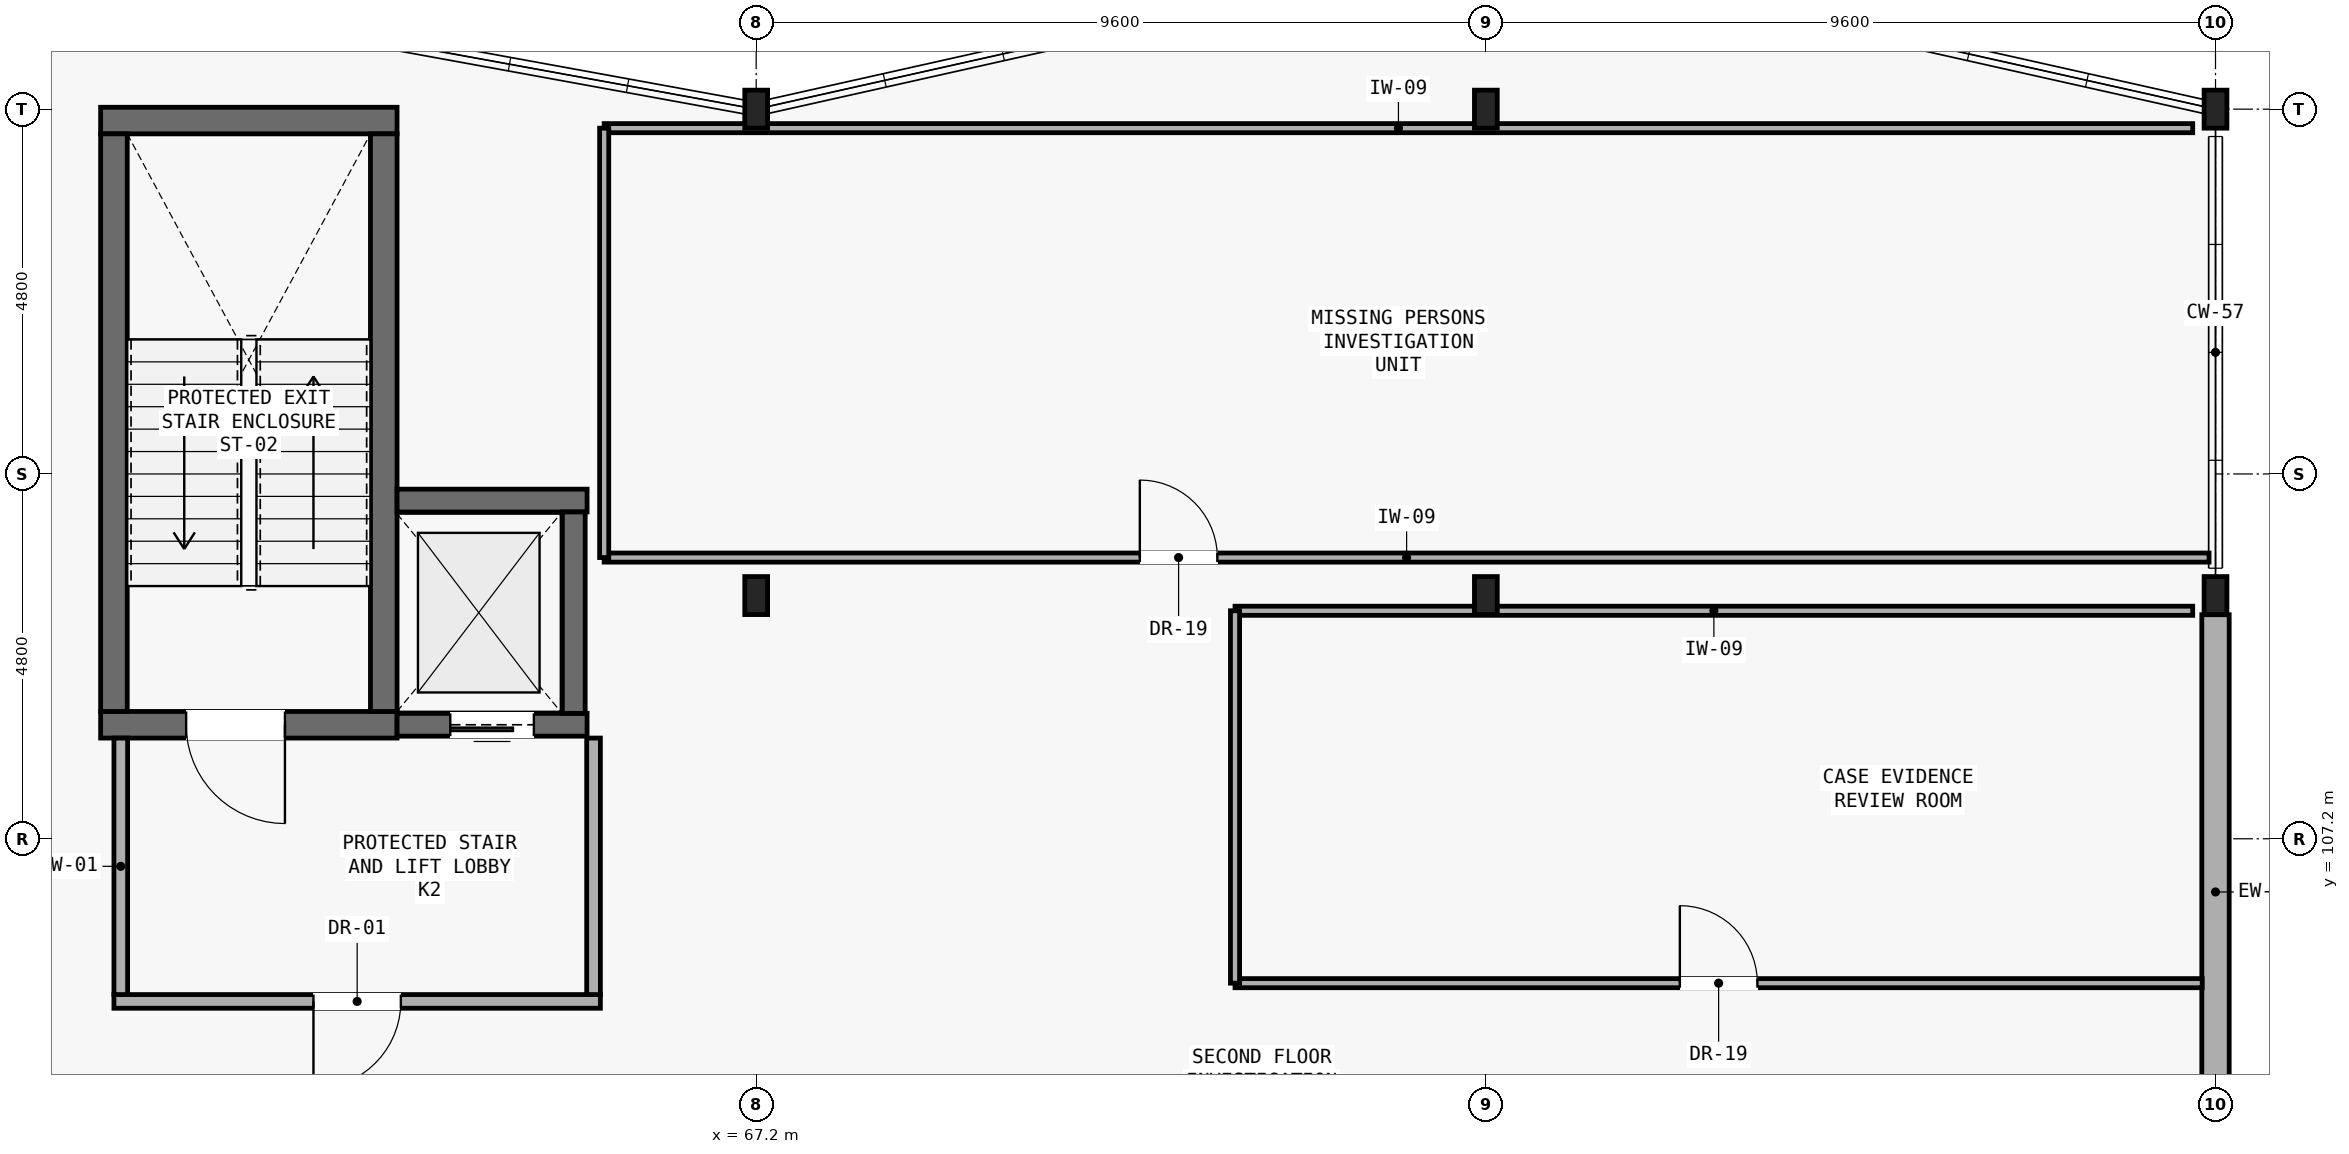
"""IFC4 building model, lengths in metres.
Left out: names, types, materials, properties, quantities, classifications, styles, units other than length and angle.
Written with IfcOpenShell. Run it as: python <this file> out.ifc"""

import sys

from ifc_helpers import new_model, si_unit, direction, frame, frame_2d, origin, origin_2d, place, context, subcontext, project, spatial, rectangle, i_section, extrude, element, fill, save


model = new_model("IFC4")
c1 = context("Model", 3, precision=1e-05, world=origin(), true_north=direction((0.0, 1.0)))
c2 = subcontext(c1, "Body", "Model", "MODEL_VIEW")
j1 = project(units=[si_unit("LENGTHUNIT", "METRE"), si_unit("PLANEANGLEUNIT", "RADIAN")], contexts=[c1])
p1 = place(None, origin())
s1 = spatial("IfcSite", under=j1, at=p1, CompositionType="ELEMENT")
p2 = place(p1, origin())
s2 = spatial("IfcBuilding", under=s1, at=p2, CompositionType="ELEMENT")
p3 = place(p2, frame((0.0, 0.0, 9.45)))
s3 = spatial("IfcBuildingStorey", under=s2, at=p3, CompositionType="ELEMENT", Elevation=9.45)
for number, where, z_axis, x_axis in (
    (1, (67.2, 110.4, 0.0), (0.0, 0.0, 1.0), (1.0, 0.0, 0.0)),
    (2, (67.2, 116.8, 0.0), (0.0, 0.0, 1.0), (1.0, 0.0, 0.0)),
    (3, (76.8, 110.4, 0.0), (0.0, 0.0, 1.0), (1.0, 0.0, 0.0)),
    (4, (76.8, 116.8, 0.0), (0.0, 0.0, 1.0), (1.0, 0.0, 0.0)),
    (5, (86.4, 110.4, 0.0), (0.0, 0.0, 1.0), (1.0, 0.0, 0.0)),
    (6, (86.4, 116.8, 0.0), (0.0, 0.0, 1.0), (1.0, 0.0, 0.0)),
):
    element("IfcColumn", number, at=place(p3, frame(where, z_axis=z_axis, x_axis=x_axis)), inside=s3, PredefinedType="COLUMN", context=c2, shape_type="SweptSolid", body=[
        extrude(i_section(OverallWidth=0.3, OverallDepth=0.5, WebThickness=0.014, FlangeThickness=0.028, FilletRadius=0.027, at=origin_2d()), origin(), (0.0, 0.0, 1.0), 4.2),
    ])
p4 = place(p3, frame((86.4, 102.852, 0.0), z_axis=(0.0, 0.0, 1.0), x_axis=(0.0, 1.0, 0.0)))
e7 = element("IfcWall", 7, at=p4, inside=s3, PredefinedType="SOLIDWALL", context=c2, shape_type="SweptSolid", body=[
    extrude(rectangle(XDim=7.296, YDim=0.36, at=frame_2d((3.648, 0.0))), origin(), (0.0, 0.0, 1.0), 3.51),
])
p5 = place(p3, frame((58.575, 108.7, 0.0), z_axis=(0.0, 0.0, 1.0), x_axis=(1.0, 0.0, 0.0)))
e8 = element("IfcWall", 8, at=p5, inside=s3, PredefinedType="SHEAR", context=c2, shape_type="SweptSolid", body=[
    extrude(rectangle(XDim=3.9, YDim=0.35, at=frame_2d((1.95, 0.0))), origin(), (0.0, 0.0, 1.0), 3.97),
])
p6 = place(p5, frame((1.125, 0.0, 0.0)))
e9 = element("IfcOpeningElement", 9, at=p6, cuts=e8, PredefinedType="OPENING", context=c2, shape_type="SweptSolid", body=[
    extrude(rectangle(XDim=1.3, YDim=2.15, at=frame_2d((0.65, 1.075))), frame((0.0, 0.185, 0.0), z_axis=(0.0, -1.0, 0.0), x_axis=(1.0, 0.0, 0.0)), (0.0, 0.0, 1.0), 0.37),
])
p7 = place(p3, frame((58.575, 116.65, 0.0), z_axis=(0.0, 0.0, 1.0), x_axis=(1.0, 0.0, 0.0)))
e10 = element("IfcWall", 10, at=p7, inside=s3, PredefinedType="SHEAR", context=c2, shape_type="SweptSolid", body=[
    extrude(rectangle(XDim=3.9, YDim=0.35, at=frame_2d((1.95, 0.0))), origin(), (0.0, 0.0, 1.0), 3.97),
])
for number, where, z_axis, x_axis in (
    (11, (58.75, 108.875, 0.0), (0.0, 0.0, 1.0), (0.0, 1.0, 0.0)),
    (12, (62.3, 108.875, 0.0), (0.0, 0.0, 1.0), (0.0, 1.0, 0.0)),
):
    element("IfcWall", number, at=place(p3, frame(where, z_axis=z_axis, x_axis=x_axis)), inside=s3, PredefinedType="SHEAR", context=c2, shape_type="SweptSolid", body=[
        extrude(rectangle(XDim=7.6, YDim=0.35, at=frame_2d((3.8, 0.0))), origin(), (0.0, 0.0, 1.0), 3.97),
    ])
p8 = place(p3, frame((62.475, 108.7, 0.0), z_axis=(0.0, 0.0, 1.0), x_axis=(1.0, 0.0, 0.0)))
e13 = element("IfcWall", 13, at=p8, inside=s3, PredefinedType="SHEAR", context=c2, shape_type="SweptSolid", body=[
    extrude(rectangle(XDim=2.5, YDim=0.3, at=frame_2d((1.25, 0.0))), origin(), (0.0, 0.0, 1.0), 3.97),
])
p9 = place(p8, frame((0.7, 0.0, 0.0)))
e14 = element("IfcOpeningElement", 14, at=p9, cuts=e13, PredefinedType="OPENING", context=c2, shape_type="SweptSolid", body=[
    extrude(rectangle(XDim=1.1, YDim=2.1, at=frame_2d((0.55, 1.05))), frame((0.0, 0.16, 0.0), z_axis=(0.0, -1.0, 0.0), x_axis=(1.0, 0.0, 0.0)), (0.0, 0.0, 1.0), 0.32),
])
p10 = place(p3, frame((62.475, 111.65, 0.0), z_axis=(0.0, 0.0, 1.0), x_axis=(1.0, 0.0, 0.0)))
e15 = element("IfcWall", 15, at=p10, inside=s3, PredefinedType="SHEAR", context=c2, shape_type="SweptSolid", body=[
    extrude(rectangle(XDim=2.5, YDim=0.3, at=frame_2d((1.25, 0.0))), origin(), (0.0, 0.0, 1.0), 3.97),
])
p11 = place(p3, frame((64.8, 108.85, 0.0), z_axis=(0.0, 0.0, 1.0), x_axis=(0.0, 1.0, 0.0)))
e16 = element("IfcWall", 16, at=p11, inside=s3, PredefinedType="SHEAR", context=c2, shape_type="SweptSolid", body=[
    extrude(rectangle(XDim=2.65, YDim=0.3, at=frame_2d((1.325, 0.0))), origin(), (0.0, 0.0, 1.0), 3.97),
])
p12 = place(p3, frame((58.75, 105.06, 0.0), z_axis=(0.0, 0.0, 1.0), x_axis=(1.0, 0.0, 0.0)))
e17 = element("IfcWall", 17, at=p12, inside=s3, PredefinedType="PARTITIONING", context=c2, shape_type="SweptSolid", body=[
    extrude(rectangle(XDim=6.4, YDim=0.18, at=frame_2d((3.2, 0.0))), origin(), (0.0, 0.0, 1.0), 3.59),
])
p13 = place(p12, frame((2.625, 0.0, 0.0)))
e18 = element("IfcOpeningElement", 18, at=p13, cuts=e17, PredefinedType="OPENING", context=c2, shape_type="SweptSolid", body=[
    extrude(rectangle(XDim=1.15, YDim=2.15, at=frame_2d((0.575, 1.075))), frame((0.0, 0.1, 0.0), z_axis=(0.0, -1.0, 0.0), x_axis=(1.0, 0.0, 0.0)), (0.0, 0.0, 1.0), 0.2),
])
for number, where, z_axis, x_axis in (
    (19, (58.84, 105.15, 0.0), (0.0, 0.0, 1.0), (0.0, 1.0, 0.0)),
    (20, (65.06, 105.15, 0.0), (0.0, 0.0, 1.0), (0.0, 1.0, 0.0)),
):
    element("IfcWall", number, at=place(p3, frame(where, z_axis=z_axis, x_axis=x_axis)), inside=s3, PredefinedType="PARTITIONING", context=c2, shape_type="SweptSolid", body=[
        extrude(rectangle(XDim=3.375, YDim=0.18, at=frame_2d((1.688, 0.0))), origin(), (0.0, 0.0, 1.0), 3.97),
    ])
p14 = place(p3, frame((65.2, 110.9, 0.0), z_axis=(0.0, 0.0, 1.0), x_axis=(1.0, 0.0, 0.0)))
e21 = element("IfcWall", 21, at=p14, inside=s3, PredefinedType="PARTITIONING", context=c2, shape_type="SweptSolid", body=[
    extrude(rectangle(XDim=21.115, YDim=0.12, at=frame_2d((10.558, 0.0))), origin(), (0.0, 0.0, 1.0), 3.97),
])
p15 = place(p14, frame((7.048, 0.0, 0.0)))
e22 = element("IfcOpeningElement", 22, at=p15, cuts=e21, PredefinedType="OPENING", context=c2, shape_type="SweptSolid", body=[
    extrude(rectangle(XDim=1.02, YDim=2.1, at=frame_2d((0.51, 1.05))), frame((0.0, 0.07, 0.0), z_axis=(0.0, -1.0, 0.0), x_axis=(1.0, 0.0, 0.0)), (0.0, 0.0, 1.0), 0.14),
])
p16 = place(p3, frame((86.1, 116.55, 0.0), z_axis=(0.0, 0.0, 1.0), x_axis=(-1.0, 0.0, 0.0)))
e23 = element("IfcWall", 23, at=p16, inside=s3, PredefinedType="PARTITIONING", context=c2, shape_type="SweptSolid", body=[
    extrude(rectangle(XDim=20.9, YDim=0.12, at=frame_2d((10.45, 0.0))), origin(), (0.0, 0.0, 1.0), 3.64),
])
p17 = place(p3, frame((65.2, 116.55, 0.0), z_axis=(0.0, 0.0, 1.0), x_axis=(0.0, -1.0, 0.0)))
e24 = element("IfcWall", 24, at=p17, inside=s3, PredefinedType="PARTITIONING", context=c2, shape_type="SweptSolid", body=[
    extrude(rectangle(XDim=5.65, YDim=0.12, at=frame_2d((2.825, 0.0))), origin(), (0.0, 0.0, 1.0), 3.97),
])
p18 = place(p3, frame((73.5, 105.3, 0.0), z_axis=(0.0, 0.0, 1.0), x_axis=(1.0, 0.0, 0.0)))
e25 = element("IfcWall", 25, at=p18, inside=s3, PredefinedType="PARTITIONING", context=c2, shape_type="SweptSolid", body=[
    extrude(rectangle(XDim=12.725, YDim=0.12, at=frame_2d((6.363, 0.0))), origin(), (0.0, 0.0, 1.0), 3.59),
])
p19 = place(p18, frame((5.853, 0.0, 0.0)))
e26 = element("IfcOpeningElement", 26, at=p19, cuts=e25, PredefinedType="OPENING", context=c2, shape_type="SweptSolid", body=[
    extrude(rectangle(XDim=1.02, YDim=2.1, at=frame_2d((0.51, 1.05))), frame((0.0, 0.07, 0.0), z_axis=(0.0, -1.0, 0.0), x_axis=(1.0, 0.0, 0.0)), (0.0, 0.0, 1.0), 0.14),
])
p20 = place(p3, frame((86.1, 110.2, 0.0), z_axis=(0.0, 0.0, 1.0), x_axis=(-1.0, 0.0, 0.0)))
e27 = element("IfcWall", 27, at=p20, inside=s3, PredefinedType="PARTITIONING", context=c2, shape_type="SweptSolid", body=[
    extrude(rectangle(XDim=12.6, YDim=0.12, at=frame_2d((6.3, 0.0))), origin(), (0.0, 0.0, 1.0), 3.41),
])
p21 = place(p3, frame((73.5, 110.2, 0.0), z_axis=(0.0, 0.0, 1.0), x_axis=(0.0, -1.0, 0.0)))
e28 = element("IfcWall", 28, at=p21, inside=s3, PredefinedType="PARTITIONING", context=c2, shape_type="SweptSolid", body=[
    extrude(rectangle(XDim=4.9, YDim=0.12, at=frame_2d((2.45, 0.0))), origin(), (0.0, 0.0, 1.0), 3.97),
])
p22 = place(p6, frame((1.3, 0.0, 0.0), z_axis=(0.0, 0.0, 1.0), x_axis=(-1.0, 0.0, 0.0)))
e29 = element("IfcDoor", 29, at=p22, inside=s3, OperationType="SINGLE_SWING_RIGHT", PredefinedType="DOOR", context=c2, shape_type="SweptSolid", body=[
    extrude(rectangle(XDim=1.3, YDim=2.15, at=frame_2d((0.65, 1.075))), frame((0.0, 0.025, 0.0), z_axis=(0.0, -1.0, 0.0), x_axis=(1.0, 0.0, 0.0)), (0.0, 0.0, 1.0), 0.05),
])
fill(e9, e29)
p23 = place(p9, frame((1.1, 0.0, 0.0), z_axis=(0.0, 0.0, 1.0), x_axis=(-1.0, 0.0, 0.0)))
e30 = element("IfcDoor", 30, at=p23, inside=s3, OperationType="SLIDING_TO_LEFT", PredefinedType="DOOR", context=c2, shape_type="SweptSolid", body=[
    extrude(rectangle(XDim=1.1, YDim=2.1, at=frame_2d((0.55, 1.05))), frame((0.0, 0.025, 0.0), z_axis=(0.0, -1.0, 0.0), x_axis=(1.0, 0.0, 0.0)), (0.0, 0.0, 1.0), 0.05),
])
fill(e14, e30)
p24 = place(p13, frame((1.15, 0.0, 0.0), z_axis=(0.0, 0.0, 1.0), x_axis=(-1.0, 0.0, 0.0)))
e31 = element("IfcDoor", 31, at=p24, inside=s3, OperationType="SINGLE_SWING_LEFT", PredefinedType="DOOR", context=c2, shape_type="SweptSolid", body=[
    extrude(rectangle(XDim=1.15, YDim=2.15, at=frame_2d((0.575, 1.075))), frame((0.0, 0.025, 0.0), z_axis=(0.0, -1.0, 0.0), x_axis=(1.0, 0.0, 0.0)), (0.0, 0.0, 1.0), 0.05),
])
fill(e18, e31)
p25 = place(p15, origin())
e32 = element("IfcDoor", 32, at=p25, inside=s3, OperationType="SINGLE_SWING_LEFT", PredefinedType="DOOR", context=c2, shape_type="SweptSolid", body=[
    extrude(rectangle(XDim=1.02, YDim=2.1, at=frame_2d((0.51, 1.05))), frame((0.0, 0.025, 0.0), z_axis=(0.0, -1.0, 0.0), x_axis=(1.0, 0.0, 0.0)), (0.0, 0.0, 1.0), 0.05),
])
fill(e22, e32)
p26 = place(p19, origin())
e33 = element("IfcDoor", 33, at=p26, inside=s3, OperationType="SINGLE_SWING_LEFT", PredefinedType="DOOR", context=c2, shape_type="SweptSolid", body=[
    extrude(rectangle(XDim=1.02, YDim=2.1, at=frame_2d((0.51, 1.05))), frame((0.0, 0.025, 0.0), z_axis=(0.0, -1.0, 0.0), x_axis=(1.0, 0.0, 0.0)), (0.0, 0.0, 1.0), 0.05),
])
fill(e26, e33)
save(model, sys.argv[1])
